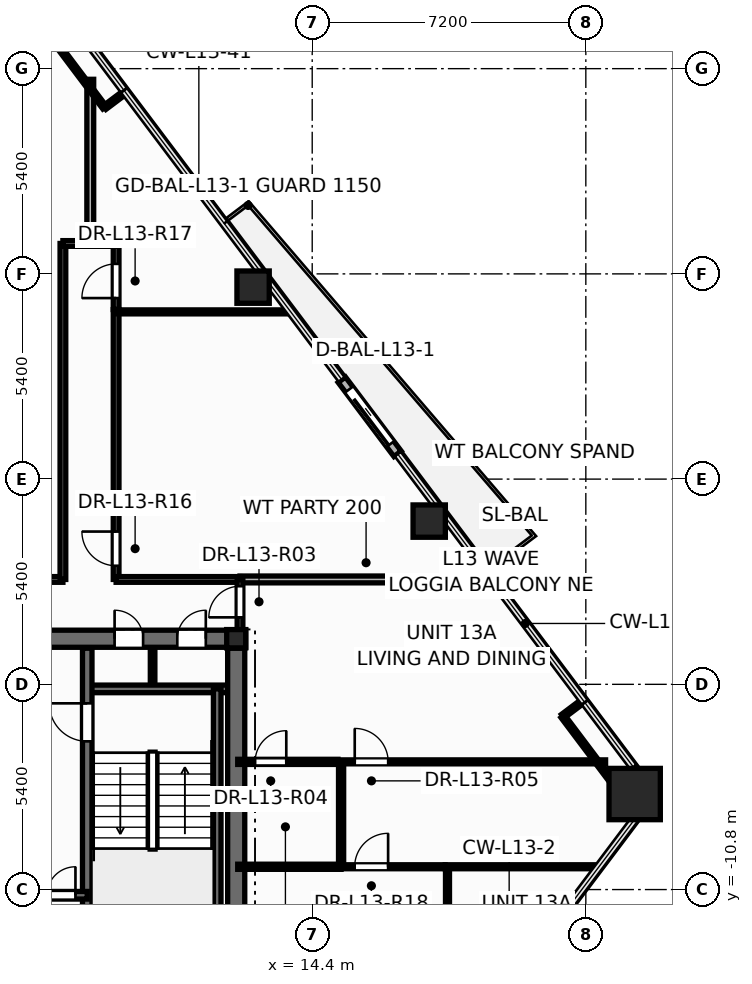
"""IFC4 building model, lengths in metres.
Left out: names, types, materials, properties, quantities, classifications, styles, units other than length and angle.
Written with IfcOpenShell. Run it as: python <this file> out.ifc"""

import sys

from ifc_helpers import new_model, si_unit, direction, frame, frame_2d, origin, origin_2d, place, context, subcontext, project, spatial, rectangle, hollow_rectangle, hollow_circle, i_section, extrude, element, fill, save


model = new_model("IFC4")
c1 = context("Model", 3, precision=1e-05, world=origin(), true_north=direction((0.0, 1.0)))
c2 = subcontext(c1, "Body", "Model", "MODEL_VIEW")
j1 = project(units=[si_unit("LENGTHUNIT", "METRE"), si_unit("PLANEANGLEUNIT", "RADIAN")], contexts=[c1])
p1 = place(None, origin())
s1 = spatial("IfcSite", under=j1, at=p1, CompositionType="ELEMENT")
p2 = place(p1, origin())
s2 = spatial("IfcBuilding", under=s1, at=p2, CompositionType="ELEMENT")
p3 = place(p2, frame((0.0, 0.0, 53.1)))
s3 = spatial("IfcBuildingStorey", under=s2, at=p3, CompositionType="ELEMENT", Elevation=53.1)
p4 = place(p3, frame((22.885, -8.287, 0.0), z_axis=(0.0, 0.0, 1.0), x_axis=(1.0, 0.0, 0.0)))
e1 = element("IfcColumn", 1, at=p4, inside=s3, PredefinedType="COLUMN", context=c2, shape_type="SweptSolid", body=[
    extrude(hollow_rectangle(XDim=1.35, YDim=1.35, WallThickness=0.065, at=origin_2d()), origin(), (0.0, 0.0, 1.0), 3.6),
])
for number, where, z_axis, x_axis in (
    (2, (17.479, -1.104, 0.0), (0.0, 0.0, 1.0), (1.0, 0.0, 0.0)),
    (3, (12.844, 5.051, 0.0), (0.0, 0.0, 1.0), (1.0, 0.0, 0.0)),
):
    element("IfcColumn", number, at=place(p3, frame(where, z_axis=z_axis, x_axis=x_axis)), inside=s3, PredefinedType="COLUMN", context=c2, shape_type="SweptSolid", body=[
        extrude(hollow_circle(Radius=0.425, WallThickness=0.038, at=origin_2d()), origin(), (0.0, 0.0, 1.0), 3.6),
    ])
p5 = place(p3, frame((12.4, -4.2, 0.0), z_axis=(0.0, 0.0, 1.0), x_axis=(1.0, 0.0, 0.0)))
e4 = element("IfcColumn", 4, at=p5, inside=s3, PredefinedType="COLUMN", context=c2, shape_type="SweptSolid", body=[
    extrude(i_section(OverallWidth=0.5, OverallDepth=0.482, WebThickness=0.04, FlangeThickness=0.045, at=origin_2d()), origin(), (0.0, 0.0, 1.0), 3.6),
])
p6 = place(p3, frame((16.646, 0.666, -0.015), z_axis=(0.0, 0.0, 1.0), x_axis=(-0.601471893772, 0.79889396105, 0.0)))
e5 = element("IfcWall", 5, at=p6, inside=s3, PredefinedType="STANDARD", context=c2, shape_type="SweptSolid", body=[
    extrude(rectangle(XDim=2.44, YDim=0.24, at=frame_2d((1.22, 0.0))), origin(), (0.0, 0.0, 1.0), 2.729),
])
p7 = place(p6, frame((0.32, 0.0, 0.015)))
e6 = element("IfcOpeningElement", 6, at=p7, cuts=e5, PredefinedType="OPENING", context=c2, shape_type="SweptSolid", body=[
    extrude(rectangle(XDim=1.806, YDim=2.204, at=frame_2d((0.9, 1.102))), frame((0.0, 0.13, 0.0), z_axis=(0.0, -1.0, 0.0), x_axis=(1.0, 0.0, 0.0)), (0.0, 0.0, 1.0), 0.26),
])
p8 = place(p3, frame((10.2, -5.52, 0.0), z_axis=(0.0, 0.0, 1.0), x_axis=(0.0, 1.0, 0.0)))
e7 = element("IfcWall", 7, at=p8, inside=s3, PredefinedType="PARTITIONING", context=c2, shape_type="SweptSolid", body=[
    extrude(rectangle(XDim=1.12, YDim=0.12, at=frame_2d((0.56, 0.0))), origin(), (0.0, 0.0, 1.0), 3.35),
])
p9 = place(p3, frame((-12.65, -4.2, 0.0), z_axis=(0.0, 0.0, 1.0), x_axis=(1.0, 0.0, 0.0)))
e8 = element("IfcWall", 8, at=p9, inside=s3, PredefinedType="SHEAR", context=c2, shape_type="SweptSolid", body=[
    extrude(rectangle(XDim=25.3, YDim=0.45, at=frame_2d((12.65, 0.0))), origin(), (0.0, 0.0, 1.0), 3.6),
])
p10 = place(p9, frame((1.85, 0.0, 0.0)))
e9 = element("IfcOpeningElement", 9, at=p10, cuts=e8, PredefinedType="OPENING", context=c2, shape_type="SweptSolid", body=[
    extrude(rectangle(XDim=0.756, YDim=2.054, at=frame_2d((0.375, 1.027))), frame((0.0, 0.235, 0.0), z_axis=(0.0, -1.0, 0.0), x_axis=(1.0, 0.0, 0.0)), (0.0, 0.0, 1.0), 0.47),
])
p11 = place(p9, frame((21.85, 0.0, 0.0)))
e10 = element("IfcOpeningElement", 10, at=p11, cuts=e8, PredefinedType="OPENING", context=c2, shape_type="SweptSolid", body=[
    extrude(rectangle(XDim=0.756, YDim=2.054, at=frame_2d((0.375, 1.027))), frame((0.0, 0.235, 0.0), z_axis=(0.0, -1.0, 0.0), x_axis=(1.0, 0.0, 0.0)), (0.0, 0.0, 1.0), 0.47),
])
p12 = place(p9, frame((23.5, 0.0, 0.0)))
e11 = element("IfcOpeningElement", 11, at=p12, cuts=e8, PredefinedType="OPENING", context=c2, shape_type="SweptSolid", body=[
    extrude(rectangle(XDim=0.756, YDim=2.054, at=frame_2d((0.375, 1.027))), frame((0.0, 0.235, 0.0), z_axis=(0.0, -1.0, 0.0), x_axis=(1.0, 0.0, 0.0)), (0.0, 0.0, 1.0), 0.47),
])
p13 = place(p9, frame((5.85, 0.0, 0.0)))
e12 = element("IfcOpeningElement", 12, at=p13, cuts=e8, PredefinedType="OPENING", context=c2, shape_type="SweptSolid", body=[
    extrude(rectangle(XDim=1.006, YDim=2.104, at=frame_2d((0.5, 1.052))), frame((0.0, 0.235, 0.0), z_axis=(0.0, -1.0, 0.0), x_axis=(1.0, 0.0, 0.0)), (0.0, 0.0, 1.0), 0.47),
])
p14 = place(p9, frame((10.35, 0.0, 0.0)))
e13 = element("IfcOpeningElement", 13, at=p14, cuts=e8, PredefinedType="OPENING", context=c2, shape_type="SweptSolid", body=[
    extrude(rectangle(XDim=1.406, YDim=2.154, at=frame_2d((0.7, 1.077))), frame((0.0, 0.235, 0.0), z_axis=(0.0, -1.0, 0.0), x_axis=(1.0, 0.0, 0.0)), (0.0, 0.0, 1.0), 0.47),
])
p15 = place(p9, frame((18.45, 0.0, 0.0)))
e14 = element("IfcOpeningElement", 14, at=p15, cuts=e8, PredefinedType="OPENING", context=c2, shape_type="SweptSolid", body=[
    extrude(rectangle(XDim=1.006, YDim=2.104, at=frame_2d((0.5, 1.052))), frame((0.0, 0.235, 0.0), z_axis=(0.0, -1.0, 0.0), x_axis=(1.0, 0.0, 0.0)), (0.0, 0.0, 1.0), 0.47),
])
p16 = place(p3, frame((8.48, -5.52, 0.0), z_axis=(0.0, 0.0, 1.0), x_axis=(1.0, 0.0, 0.0)))
e15 = element("IfcWall", 15, at=p16, inside=s3, PredefinedType="SOLIDWALL", context=c2, shape_type="SweptSolid", body=[
    extrude(rectangle(XDim=3.87, YDim=0.2, at=frame_2d((1.935, 0.0))), origin(), (0.0, 0.0, 1.0), 3.6),
])
p17 = place(p3, frame((11.9, -13.1, 0.0), z_axis=(0.0, 0.0, 1.0), x_axis=(0.0, 1.0, 0.0)))
e16 = element("IfcWall", 16, at=p17, inside=s3, PredefinedType="SOLIDWALL", context=c2, shape_type="SweptSolid", body=[
    extrude(rectangle(XDim=7.58, YDim=0.2, at=frame_2d((3.79, 0.0))), origin(), (0.0, 0.0, 1.0), 3.6),
])
p18 = place(p3, frame((8.48, -13.85, 0.0), z_axis=(0.0, 0.0, 1.0), x_axis=(0.0, 1.0, 0.0)))
e17 = element("IfcWall", 17, at=p18, inside=s3, PredefinedType="SHEAR", context=c2, shape_type="SweptSolid", body=[
    extrude(rectangle(XDim=9.4, YDim=0.25, at=frame_2d((4.7, 0.0))), origin(), (0.0, 0.0, 1.0), 3.6),
])
p19 = place(p18, frame((6.95, 0.0, 0.0)))
e18 = element("IfcOpeningElement", 18, at=p19, cuts=e17, PredefinedType="OPENING", context=c2, shape_type="SweptSolid", body=[
    extrude(rectangle(XDim=1.006, YDim=2.104, at=frame_2d((0.5, 1.052))), frame((0.0, 0.135, 0.0), z_axis=(0.0, -1.0, 0.0), x_axis=(1.0, 0.0, 0.0)), (0.0, 0.0, 1.0), 0.27),
])
p20 = place(p3, frame((5.12, -10.95, 0.0), z_axis=(0.0, 0.0, 1.0), x_axis=(1.0, 0.0, 0.0)))
e19 = element("IfcWall", 19, at=p20, inside=s3, PredefinedType="SOLIDWALL", context=c2, shape_type="SweptSolid", body=[
    extrude(rectangle(XDim=3.36, YDim=0.2, at=frame_2d((1.68, 0.0))), origin(), (0.0, 0.0, 1.0), 3.6),
])
p21 = place(p20, frame((0.42, 0.0, 0.0)))
e20 = element("IfcOpeningElement", 20, at=p21, cuts=e19, PredefinedType="OPENING", context=c2, shape_type="SweptSolid", body=[
    extrude(rectangle(XDim=1.106, YDim=2.104, at=frame_2d((0.55, 1.052))), frame((0.0, 0.11, 0.0), z_axis=(0.0, -1.0, 0.0), x_axis=(1.0, 0.0, 0.0)), (0.0, 0.0, 1.0), 0.22),
])
p22 = place(p20, frame((2.3, 0.0, 0.0)))
e21 = element("IfcOpeningElement", 21, at=p22, cuts=e19, PredefinedType="OPENING", context=c2, shape_type="SweptSolid", body=[
    extrude(rectangle(XDim=0.756, YDim=2.054, at=frame_2d((0.375, 1.027))), frame((0.0, 0.11, 0.0), z_axis=(0.0, -1.0, 0.0), x_axis=(1.0, 0.0, 0.0)), (0.0, 0.0, 1.0), 0.22),
])
p23 = place(p3, frame((12.4, -13.85, 0.0), z_axis=(0.0, 0.0, 1.0), x_axis=(0.0, 1.0, 0.0)))
e22 = element("IfcWall", 22, at=p23, inside=s3, PredefinedType="SHEAR", context=c2, shape_type="SweptSolid", body=[
    extrude(rectangle(XDim=9.4, YDim=0.45, at=frame_2d((4.7, 0.0))), origin(), (0.0, 0.0, 1.0), 3.6),
])
p24 = place(p3, frame((-6.0, -2.64, 0.0), z_axis=(0.0, 0.0, 1.0), x_axis=(1.0, 0.0, 0.0)))
e23 = element("IfcWall", 23, at=p24, inside=s3, PredefinedType="PARTITIONING", context=c2, shape_type="SweptSolid", body=[
    extrude(rectangle(XDim=13.84, YDim=0.15, at=frame_2d((6.92, 0.0))), origin(), (0.0, 0.0, 1.0), 2.325),
])
p25 = place(p24, frame((0.4, 0.0, 0.0)))
e24 = element("IfcOpeningElement", 24, at=p25, cuts=e23, PredefinedType="OPENING", context=c2, shape_type="SweptSolid", body=[
    extrude(rectangle(XDim=0.906, YDim=2.104, at=frame_2d((0.45, 1.052))), frame((0.0, 0.085, 0.0), z_axis=(0.0, -1.0, 0.0), x_axis=(1.0, 0.0, 0.0)), (0.0, 0.0, 1.0), 0.17),
])
p26 = place(p3, frame((7.84, -2.64, 0.0), z_axis=(0.0, 0.0, 1.0), x_axis=(0.0, 1.0, 0.0)))
e25 = element("IfcWall", 25, at=p26, inside=s3, PredefinedType="PARTITIONING", context=c2, shape_type="SweptSolid", body=[
    extrude(rectangle(XDim=8.84, YDim=0.15, at=frame_2d((4.42, 0.0))), origin(), (0.0, 0.0, 1.0), 2.509),
])
p27 = place(p3, frame((9.24, -2.64, 0.0), z_axis=(0.0, 0.0, 1.0), x_axis=(0.0, 1.0, 0.0)))
e26 = element("IfcWall", 26, at=p27, inside=s3, PredefinedType="PARTITIONING", context=c2, shape_type="SweptSolid", body=[
    extrude(rectangle(XDim=7.1, YDim=0.15, at=frame_2d((3.55, 0.0))), origin(), (0.0, 0.0, 1.0), 2.509),
])
p28 = place(p27, frame((0.36, 0.0, 0.0)))
e27 = element("IfcOpeningElement", 27, at=p28, cuts=e26, PredefinedType="OPENING", context=c2, shape_type="SweptSolid", body=[
    extrude(rectangle(XDim=0.906, YDim=2.104, at=frame_2d((0.45, 1.052))), frame((0.0, 0.085, 0.0), z_axis=(0.0, -1.0, 0.0), x_axis=(1.0, 0.0, 0.0)), (0.0, 0.0, 1.0), 0.17),
])
p29 = place(p3, frame((15.08, -7.44, 0.0), z_axis=(0.0, 0.0, 1.0), x_axis=(1.0, 0.0, 0.0)))
e28 = element("IfcWall", 28, at=p29, inside=s3, PredefinedType="PARTITIONING", context=c2, shape_type="SweptSolid", body=[
    extrude(rectangle(XDim=7.04, YDim=0.105, at=frame_2d((3.52, 0.0))), origin(), (0.0, 0.0, 1.0), 2.325),
])
p30 = place(p29, frame((0.439, 0.0, 0.0)))
e29 = element("IfcOpeningElement", 29, at=p30, cuts=e28, PredefinedType="OPENING", context=c2, shape_type="SweptSolid", body=[
    extrude(rectangle(XDim=0.886, YDim=2.104, at=frame_2d((0.44, 1.052))), frame((0.0, 0.062, 0.0), z_axis=(0.0, -1.0, 0.0), x_axis=(1.0, 0.0, 0.0)), (0.0, 0.0, 1.0), 0.125),
])
p31 = place(p3, frame((12.5, -2.64, 0.0), z_axis=(0.0, 0.0, 1.0), x_axis=(1.0, 0.0, 0.0)))
e30 = element("IfcWall", 30, at=p31, inside=s3, PredefinedType="PARTITIONING", context=c2, shape_type="SweptSolid", body=[
    extrude(rectangle(XDim=6.635, YDim=0.18, at=frame_2d((3.318, 0.0))), origin(), (0.0, 0.0, 1.0), 2.713),
])
p32 = place(p3, frame((17.96, -15.494, 0.0), z_axis=(0.0, 0.0, 1.0), x_axis=(0.0, 1.0, 0.0)))
e31 = element("IfcWall", 31, at=p32, inside=s3, PredefinedType="PARTITIONING", context=c2, shape_type="SweptSolid", body=[
    extrude(rectangle(XDim=5.294, YDim=0.105, at=frame_2d((2.647, 0.0))), origin(), (0.0, 0.0, 1.0), 2.713),
])
p33 = place(p32, frame((0.1, 0.0, 0.0)))
e32 = element("IfcOpeningElement", 32, at=p33, cuts=e31, PredefinedType="OPENING", context=c2, shape_type="SweptSolid", body=[
    extrude(rectangle(XDim=0.886, YDim=2.104, at=frame_2d((0.44, 1.052))), frame((0.0, 0.062, 0.0), z_axis=(0.0, -1.0, 0.0), x_axis=(1.0, 0.0, 0.0)), (0.0, 0.0, 1.0), 0.125),
])
p34 = place(p3, frame((9.24, 4.4, 0.0), z_axis=(0.0, 0.0, 1.0), x_axis=(1.0, 0.0, 0.0)))
e33 = element("IfcWall", 33, at=p34, inside=s3, PredefinedType="PARTITIONING", context=c2, shape_type="SweptSolid", body=[
    extrude(rectangle(XDim=4.595, YDim=0.105, at=frame_2d((2.298, 0.0))), origin(), (0.0, 0.0, 1.0), 2.713),
])
p35 = place(p3, frame((8.56, 6.2, 0.0), z_axis=(0.0, 0.0, 1.0), x_axis=(0.0, 1.0, 0.0)))
e34 = element("IfcWall", 34, at=p35, inside=s3, PredefinedType="PARTITIONING", context=c2, shape_type="SweptSolid", body=[
    extrude(rectangle(XDim=4.32, YDim=0.18, at=frame_2d((2.16, 0.0))), origin(), (0.0, 0.0, 1.0), 2.509),
])
p36 = place(p3, frame((17.9, -10.2, 0.0), z_axis=(0.0, 0.0, 1.0), x_axis=(1.0, 0.0, 0.0)))
e35 = element("IfcWall", 35, at=p36, inside=s3, PredefinedType="PARTITIONING", context=c2, shape_type="SweptSolid", body=[
    extrude(rectangle(XDim=4.046, YDim=0.105, at=frame_2d((2.023, 0.0))), origin(), (0.0, 0.0, 1.0), 2.713),
])
p37 = place(p3, frame((9.24, -2.64, 0.0), z_axis=(0.0, 0.0, 1.0), x_axis=(1.0, 0.0, 0.0)))
e36 = element("IfcWall", 36, at=p37, inside=s3, PredefinedType="PARTITIONING", context=c2, shape_type="SweptSolid", body=[
    extrude(rectangle(XDim=3.26, YDim=0.15, at=frame_2d((1.63, 0.0))), origin(), (0.0, 0.0, 1.0), 3.35),
])
p38 = place(p3, frame((15.16, -10.2, 0.0), z_axis=(0.0, 0.0, 1.0), x_axis=(1.0, 0.0, 0.0)))
e37 = element("IfcWall", 37, at=p38, inside=s3, PredefinedType="PARTITIONING", context=c2, shape_type="SweptSolid", body=[
    extrude(rectangle(XDim=2.738, YDim=0.105, at=frame_2d((1.369, 0.0))), origin(), (0.0, 0.0, 1.0), 3.35),
])
p39 = place(p38, frame((0.357, 0.0, 0.0)))
e38 = element("IfcOpeningElement", 38, at=p39, cuts=e37, PredefinedType="OPENING", context=c2, shape_type="SweptSolid", body=[
    extrude(rectangle(XDim=0.886, YDim=2.104, at=frame_2d((0.44, 1.052))), frame((0.0, 0.062, 0.0), z_axis=(0.0, -1.0, 0.0), x_axis=(1.0, 0.0, 0.0)), (0.0, 0.0, 1.0), 0.125),
])
p40 = place(p3, frame((12.44, -7.44, 0.0), z_axis=(0.0, 0.0, 1.0), x_axis=(1.0, 0.0, 0.0)))
e39 = element("IfcWall", 39, at=p40, inside=s3, PredefinedType="PARTITIONING", context=c2, shape_type="SweptSolid", body=[
    extrude(rectangle(XDim=2.638, YDim=0.135, at=frame_2d((1.319, 0.0))), origin(), (0.0, 0.0, 1.0), 2.713),
])
p41 = place(p40, frame((0.458, 0.0, 0.0)))
e40 = element("IfcOpeningElement", 40, at=p41, cuts=e39, PredefinedType="OPENING", context=c2, shape_type="SweptSolid", body=[
    extrude(rectangle(XDim=0.826, YDim=2.104, at=frame_2d((0.41, 1.052))), frame((0.0, 0.078, 0.0), z_axis=(0.0, -1.0, 0.0), x_axis=(1.0, 0.0, 0.0)), (0.0, 0.0, 1.0), 0.155),
])
p42 = place(p3, frame((15.16, -10.2, 0.0), z_axis=(0.0, 0.0, 1.0), x_axis=(0.0, 1.0, 0.0)))
e41 = element("IfcWall", 41, at=p42, inside=s3, PredefinedType="PARTITIONING", context=c2, shape_type="SweptSolid", body=[
    extrude(rectangle(XDim=2.76, YDim=0.135, at=frame_2d((1.38, 0.0))), origin(), (0.0, 0.0, 1.0), 3.35),
])
p43 = place(p3, frame((12.44, -10.2, 0.0), z_axis=(0.0, 0.0, 1.0), x_axis=(1.0, 0.0, 0.0)))
e42 = element("IfcWall", 42, at=p43, inside=s3, PredefinedType="PARTITIONING", context=c2, shape_type="SweptSolid", body=[
    extrude(rectangle(XDim=2.72, YDim=0.135, at=frame_2d((1.36, 0.0))), origin(), (0.0, 0.0, 1.0), 2.713),
])
p44 = place(p3, frame((8.937, 9.776, 0.0), z_axis=(0.0, 0.0, 1.0), x_axis=(-0.601407243549, 0.798942630861, 0.0)))
e43 = element("IfcWall", 43, at=p44, inside=s3, PredefinedType="PARTITIONING", context=c2, shape_type="SweptSolid", body=[
    extrude(rectangle(XDim=2.247, YDim=0.12, at=frame_2d((1.124, 0.0))), origin(), (0.0, 0.0, 1.0), 3.35),
])
p45 = place(p3, frame((9.24, 4.462, 0.0), z_axis=(0.0, 0.0, 1.0), x_axis=(0.0, 1.0, 0.0)))
e44 = element("IfcWall", 44, at=p45, inside=s3, PredefinedType="PARTITIONING", context=c2, shape_type="SweptSolid", body=[
    extrude(rectangle(XDim=1.738, YDim=0.15, at=frame_2d((0.869, 0.0))), origin(), (0.0, 0.0, 1.0), 3.35),
])
p46 = place(p45, frame((0.301, 0.0, 0.0)))
e45 = element("IfcOpeningElement", 45, at=p46, cuts=e44, PredefinedType="OPENING", context=c2, shape_type="SweptSolid", body=[
    extrude(rectangle(XDim=0.906, YDim=2.104, at=frame_2d((0.45, 1.052))), frame((0.0, 0.085, 0.0), z_axis=(0.0, -1.0, 0.0), x_axis=(1.0, 0.0, 0.0)), (0.0, 0.0, 1.0), 0.17),
])
p47 = place(p3, frame((22.345, -8.034, 0.0), z_axis=(0.0, 0.0, 1.0), x_axis=(-0.601407243549, 0.798942630861, 0.0)))
e46 = element("IfcWall", 46, at=p47, inside=s3, PredefinedType="PARTITIONING", context=c2, shape_type="SweptSolid", body=[
    extrude(rectangle(XDim=2.247, YDim=0.12, at=frame_2d((1.124, 0.0))), origin(), (0.0, 0.0, 1.0), 2.325),
])
p48 = place(p3, frame((12.5, -4.24, 0.0), z_axis=(0.0, 0.0, 1.0), x_axis=(0.0, 1.0, 0.0)))
e47 = element("IfcWall", 47, at=p48, inside=s3, PredefinedType="PARTITIONING", context=c2, shape_type="SweptSolid", body=[
    extrude(rectangle(XDim=1.6, YDim=0.15, at=frame_2d((0.8, 0.0))), origin(), (0.0, 0.0, 1.0), 2.325),
])
p49 = place(p48, frame((0.602, 0.0, 0.0)))
e48 = element("IfcOpeningElement", 48, at=p49, cuts=e47, PredefinedType="OPENING", context=c2, shape_type="SweptSolid", body=[
    extrude(rectangle(XDim=0.826, YDim=2.104, at=frame_2d((0.41, 1.052))), frame((0.0, 0.085, 0.0), z_axis=(0.0, -1.0, 0.0), x_axis=(1.0, 0.0, 0.0)), (0.0, 0.0, 1.0), 0.17),
])
p50 = place(p3, frame((23.188, -8.129, 0.0), z_axis=(0.0, 0.0, 1.0), x_axis=(-0.993721326988, 0.111883530014, 0.0)))
e49 = element("IfcWall", 49, at=p50, inside=s3, PredefinedType="PARTITIONING", context=c2, shape_type="SweptSolid", body=[
    extrude(rectangle(XDim=0.849, YDim=0.12, at=frame_2d((0.424, 0.0))), origin(), (0.0, 0.0, 1.0), 2.325),
])
p51 = place(p3, frame((7.84, 6.2, 0.0), z_axis=(0.0, 0.0, 1.0), x_axis=(1.0, 0.0, 0.0)))
e50 = element("IfcWall", 50, at=p51, inside=s3, PredefinedType="PARTITIONING", context=c2, shape_type="SweptSolid", body=[
    extrude(rectangle(XDim=1.4, YDim=0.15, at=frame_2d((0.7, 0.0))), origin(), (0.0, 0.0, 1.0), 3.35),
])
for number, where, z_axis, x_axis in (
    (51, (9.472, 10.179, 0.0), (0.0, 0.0, 1.0), (-0.799, -0.601, 0.0)),
    (52, (20.994, -6.239, 0.0), (0.0, 0.0, 1.0), (0.799, 0.602, 0.0)),
):
    element("IfcWall", number, at=place(p3, frame(where, z_axis=z_axis, x_axis=x_axis)), inside=s3, PredefinedType="PARTITIONING", context=c2, shape_type="SweptSolid", body=[
        extrude(rectangle(XDim=0.67, YDim=0.12, at=frame_2d((0.335, 0.0))), origin(), (0.0, 0.0, 1.0), 2.713),
    ])
p52 = place(p7, origin())
e53 = element("IfcDoor", 53, at=p52, inside=s3, OperationType="SLIDING_TO_LEFT", PredefinedType="DOOR", context=c2, shape_type="SweptSolid", body=[
    extrude(rectangle(XDim=1.8, YDim=2.2, at=frame_2d((0.9, 1.1))), frame((0.0, 0.025, 0.0), z_axis=(0.0, -1.0, 0.0), x_axis=(1.0, 0.0, 0.0)), (0.0, 0.0, 1.0), 0.05),
])
fill(e6, e53)
p53 = place(p19, origin())
e54 = element("IfcDoor", 54, at=p53, inside=s3, OperationType="SINGLE_SWING_RIGHT", PredefinedType="DOOR", context=c2, shape_type="SweptSolid", body=[
    extrude(rectangle(XDim=1.0, YDim=2.1, at=frame_2d((0.5, 1.05))), frame((0.0, 0.025, 0.0), z_axis=(0.0, -1.0, 0.0), x_axis=(1.0, 0.0, 0.0)), (0.0, 0.0, 1.0), 0.05),
])
fill(e18, e54)
p54 = place(p22, origin())
e55 = element("IfcDoor", 55, at=p54, inside=s3, OperationType="SINGLE_SWING_RIGHT", PredefinedType="DOOR", context=c2, shape_type="SweptSolid", body=[
    extrude(rectangle(XDim=0.75, YDim=2.05, at=frame_2d((0.375, 1.025))), frame((0.0, 0.025, 0.0), z_axis=(0.0, -1.0, 0.0), x_axis=(1.0, 0.0, 0.0)), (0.0, 0.0, 1.0), 0.05),
])
fill(e21, e55)
p55 = place(p11, origin())
e56 = element("IfcDoor", 56, at=p55, inside=s3, OperationType="SINGLE_SWING_LEFT", PredefinedType="DOOR", context=c2, shape_type="SweptSolid", body=[
    extrude(rectangle(XDim=0.75, YDim=2.05, at=frame_2d((0.375, 1.025))), frame((0.0, 0.025, 0.0), z_axis=(0.0, -1.0, 0.0), x_axis=(1.0, 0.0, 0.0)), (0.0, 0.0, 1.0), 0.05),
])
fill(e10, e56)
p56 = place(p12, origin())
e57 = element("IfcDoor", 57, at=p56, inside=s3, OperationType="SINGLE_SWING_RIGHT", PredefinedType="DOOR", context=c2, shape_type="SweptSolid", body=[
    extrude(rectangle(XDim=0.75, YDim=2.05, at=frame_2d((0.375, 1.025))), frame((0.0, 0.025, 0.0), z_axis=(0.0, -1.0, 0.0), x_axis=(1.0, 0.0, 0.0)), (0.0, 0.0, 1.0), 0.05),
])
fill(e11, e57)
p57 = place(p49, origin())
e58 = element("IfcDoor", 58, at=p57, inside=s3, OperationType="SINGLE_SWING_LEFT", PredefinedType="DOOR", context=c2, shape_type="SweptSolid", body=[
    extrude(rectangle(XDim=0.82, YDim=2.1, at=frame_2d((0.41, 1.05))), frame((0.0, 0.025, 0.0), z_axis=(0.0, -1.0, 0.0), x_axis=(1.0, 0.0, 0.0)), (0.0, 0.0, 1.0), 0.05),
])
fill(e48, e58)
p58 = place(p41, origin())
e59 = element("IfcDoor", 59, at=p58, inside=s3, OperationType="SINGLE_SWING_RIGHT", PredefinedType="DOOR", context=c2, shape_type="SweptSolid", body=[
    extrude(rectangle(XDim=0.82, YDim=2.1, at=frame_2d((0.41, 1.05))), frame((0.0, 0.025, 0.0), z_axis=(0.0, -1.0, 0.0), x_axis=(1.0, 0.0, 0.0)), (0.0, 0.0, 1.0), 0.05),
])
fill(e40, e59)
p59 = place(p30, origin())
e60 = element("IfcDoor", 60, at=p59, inside=s3, OperationType="SINGLE_SWING_LEFT", PredefinedType="DOOR", context=c2, shape_type="SweptSolid", body=[
    extrude(rectangle(XDim=0.88, YDim=2.1, at=frame_2d((0.44, 1.05))), frame((0.0, 0.025, 0.0), z_axis=(0.0, -1.0, 0.0), x_axis=(1.0, 0.0, 0.0)), (0.0, 0.0, 1.0), 0.05),
])
fill(e29, e60)
p60 = place(p28, origin())
e61 = element("IfcDoor", 61, at=p60, inside=s3, OperationType="SINGLE_SWING_RIGHT", PredefinedType="DOOR", context=c2, shape_type="SweptSolid", body=[
    extrude(rectangle(XDim=0.9, YDim=2.1, at=frame_2d((0.45, 1.05))), frame((0.0, 0.025, 0.0), z_axis=(0.0, -1.0, 0.0), x_axis=(1.0, 0.0, 0.0)), (0.0, 0.0, 1.0), 0.05),
])
fill(e27, e61)
p61 = place(p46, origin())
e62 = element("IfcDoor", 62, at=p61, inside=s3, OperationType="SINGLE_SWING_LEFT", PredefinedType="DOOR", context=c2, shape_type="SweptSolid", body=[
    extrude(rectangle(XDim=0.9, YDim=2.1, at=frame_2d((0.45, 1.05))), frame((0.0, 0.025, 0.0), z_axis=(0.0, -1.0, 0.0), x_axis=(1.0, 0.0, 0.0)), (0.0, 0.0, 1.0), 0.05),
])
fill(e45, e62)
p62 = place(p39, origin())
e63 = element("IfcDoor", 63, at=p62, inside=s3, OperationType="SINGLE_SWING_RIGHT", PredefinedType="DOOR", context=c2, shape_type="SweptSolid", body=[
    extrude(rectangle(XDim=0.88, YDim=2.1, at=frame_2d((0.44, 1.05))), frame((0.0, 0.025, 0.0), z_axis=(0.0, -1.0, 0.0), x_axis=(1.0, 0.0, 0.0)), (0.0, 0.0, 1.0), 0.05),
])
fill(e38, e63)
save(model, sys.argv[1])
